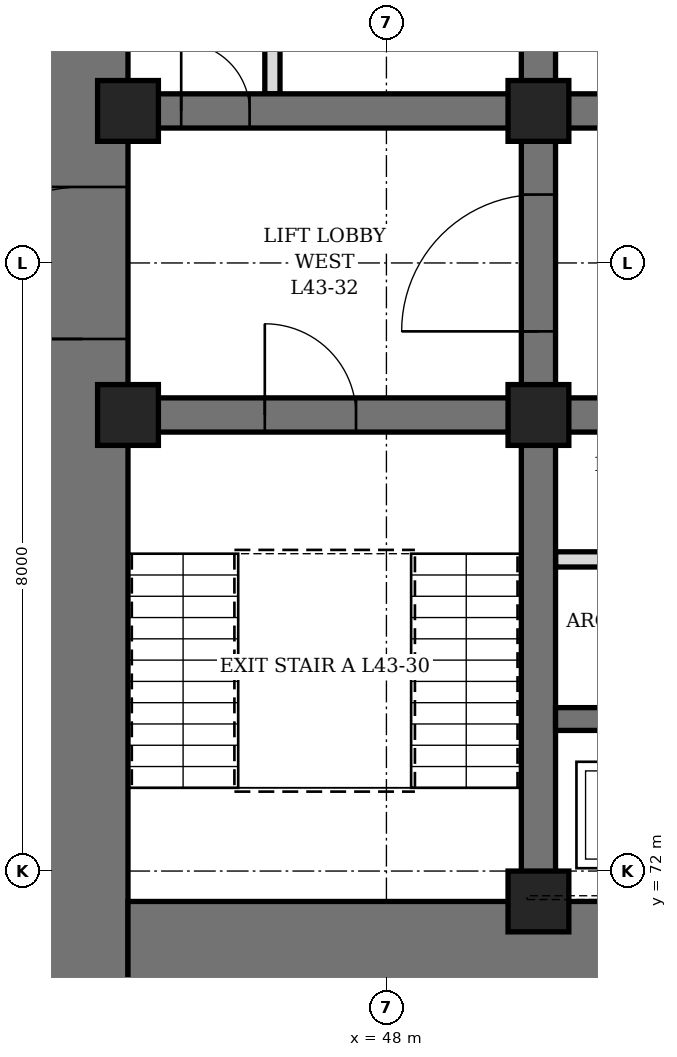
"""IFC4 building model, lengths in metres.
Left out: names, types, materials, properties, quantities, classifications, styles, units other than length and angle.
Written with IfcOpenShell. Run it as: python <this file> out.ifc"""

import sys

from ifc_helpers import new_model, si_unit, direction, frame, frame_2d, origin, origin_2d, place, context, subcontext, project, spatial, rectangle, hollow_rectangle, extrude, element, fill, save


model = new_model("IFC4")
c1 = context("Model", 3, precision=1e-05, world=origin(), true_north=direction((0.0, 1.0)))
c2 = subcontext(c1, "Body", "Model", "MODEL_VIEW")
j1 = project(units=[si_unit("LENGTHUNIT", "METRE"), si_unit("PLANEANGLEUNIT", "RADIAN")], contexts=[c1])
p1 = place(None, origin())
s1 = spatial("IfcSite", under=j1, at=p1, CompositionType="ELEMENT")
p2 = place(p1, origin())
s2 = spatial("IfcBuilding", under=s1, at=p2, CompositionType="ELEMENT")
p3 = place(p2, frame((0.0, 0.0, 193.9)))
s3 = spatial("IfcBuildingStorey", under=s2, at=p3, CompositionType="ELEMENT", Elevation=193.9)
p4 = place(p3, frame((44.0, 70.4, 0.0), z_axis=(0.0, 0.0, 1.0), x_axis=(0.0, 1.0, 0.0)))
e1 = element("IfcWall", 1, at=p4, inside=s3, PredefinedType="SHEAR", context=c2, shape_type="SweptSolid", body=[
    extrude(rectangle(XDim=19.2, YDim=1.2, at=frame_2d((9.6, 0.0))), origin(), (0.0, 0.0, 1.0), 4.2),
])
p5 = place(p4, frame((8.6, 0.0, 0.0)))
e2 = element("IfcOpeningElement", 2, at=p5, cuts=e1, PredefinedType="OPENING", context=c2, shape_type="SweptSolid", body=[
    extrude(rectangle(XDim=2.0, YDim=2.4, at=frame_2d((1.0, 1.2))), frame((0.0, 0.61, 0.0), z_axis=(0.0, -1.0, 0.0), x_axis=(1.0, 0.0, 0.0)), (0.0, 0.0, 1.0), 1.22),
])
p6 = place(p3, frame((44.6, 71.0, 0.0), z_axis=(0.0, 0.0, 1.0), x_axis=(1.0, 0.0, 0.0)))
e3 = element("IfcWall", 3, at=p6, inside=s3, PredefinedType="SHEAR", context=c2, shape_type="SweptSolid", body=[
    extrude(rectangle(XDim=22.8, YDim=1.2, at=frame_2d((11.4, 0.0))), origin(), (0.0, 0.0, 1.0), 4.2),
])
p7 = place(p6, frame((6.35, 0.0, 0.0)))
e4 = element("IfcOpeningElement", 4, at=p7, cuts=e3, PredefinedType="OPENING", context=c2, shape_type="SweptSolid", body=[
    extrude(rectangle(XDim=1.1, YDim=2.2, at=frame_2d((0.55, 1.1))), frame((0.0, 0.61, 0.0), z_axis=(0.0, -1.0, 0.0), x_axis=(1.0, 0.0, 0.0)), (0.0, 0.0, 1.0), 1.22),
])
p8 = place(p6, frame((9.35, 0.0, 0.0)))
e5 = element("IfcOpeningElement", 5, at=p8, cuts=e3, PredefinedType="OPENING", context=c2, shape_type="SweptSolid", body=[
    extrude(rectangle(XDim=1.1, YDim=2.2, at=frame_2d((0.55, 1.1))), frame((0.0, 0.61, 0.0), z_axis=(0.0, -1.0, 0.0), x_axis=(1.0, 0.0, 0.0)), (0.0, 0.0, 1.0), 1.22),
])
p9 = place(p6, frame((12.35, 0.0, 0.0)))
e6 = element("IfcOpeningElement", 6, at=p9, cuts=e3, PredefinedType="OPENING", context=c2, shape_type="SweptSolid", body=[
    extrude(rectangle(XDim=1.1, YDim=2.2, at=frame_2d((0.55, 1.1))), frame((0.0, 0.61, 0.0), z_axis=(0.0, -1.0, 0.0), x_axis=(1.0, 0.0, 0.0)), (0.0, 0.0, 1.0), 1.22),
])
p10 = place(p6, frame((15.35, 0.0, 0.0)))
e7 = element("IfcOpeningElement", 7, at=p10, cuts=e3, PredefinedType="OPENING", context=c2, shape_type="SweptSolid", body=[
    extrude(rectangle(XDim=1.1, YDim=2.2, at=frame_2d((0.55, 1.1))), frame((0.0, 0.61, 0.0), z_axis=(0.0, -1.0, 0.0), x_axis=(1.0, 0.0, 0.0)), (0.0, 0.0, 1.0), 1.22),
])
p11 = place(p3, frame((50.0, 71.6, 0.0), z_axis=(0.0, 0.0, 1.0), x_axis=(0.0, 1.0, 0.0)))
e8 = element("IfcWall", 8, at=p11, inside=s3, PredefinedType="SHEAR", context=c2, shape_type="SweptSolid", body=[
    extrude(rectangle(XDim=16.8, YDim=0.45, at=frame_2d((8.4, 0.0))), origin(), (0.0, 0.0, 1.0), 4.2),
])
p12 = place(p11, frame((7.5, 0.0, 0.0)))
e9 = element("IfcOpeningElement", 9, at=p12, cuts=e8, PredefinedType="OPENING", context=c2, shape_type="SweptSolid", body=[
    extrude(rectangle(XDim=1.8, YDim=2.4, at=frame_2d((0.9, 1.2))), frame((0.0, 0.235, 0.0), z_axis=(0.0, -1.0, 0.0), x_axis=(1.0, 0.0, 0.0)), (0.0, 0.0, 1.0), 0.47),
])
p13 = place(p3, frame((44.6, 78.0, 0.0), z_axis=(0.0, 0.0, 1.0), x_axis=(1.0, 0.0, 0.0)))
e10 = element("IfcWall", 10, at=p13, inside=s3, PredefinedType="SHEAR", context=c2, shape_type="SweptSolid", body=[
    extrude(rectangle(XDim=5.175, YDim=0.45, at=frame_2d((2.587, 0.0))), origin(), (0.0, 0.0, 1.0), 4.2),
])
p14 = place(p13, frame((1.8, 0.0, 0.0)))
e11 = element("IfcOpeningElement", 11, at=p14, cuts=e10, PredefinedType="OPENING", context=c2, shape_type="SweptSolid", body=[
    extrude(rectangle(XDim=1.2, YDim=2.1, at=frame_2d((0.6, 1.05))), frame((0.0, 0.235, 0.0), z_axis=(0.0, -1.0, 0.0), x_axis=(1.0, 0.0, 0.0)), (0.0, 0.0, 1.0), 0.47),
])
p15 = place(p3, frame((44.6, 82.0, 0.0), z_axis=(0.0, 0.0, 1.0), x_axis=(1.0, 0.0, 0.0)))
e12 = element("IfcWall", 12, at=p15, inside=s3, PredefinedType="SHEAR", context=c2, shape_type="SweptSolid", body=[
    extrude(rectangle(XDim=5.175, YDim=0.45, at=frame_2d((2.587, 0.0))), origin(), (0.0, 0.0, 1.0), 4.2),
])
p16 = place(p15, frame((0.7, 0.0, 0.0)))
e13 = element("IfcOpeningElement", 13, at=p16, cuts=e12, PredefinedType="OPENING", context=c2, shape_type="SweptSolid", body=[
    extrude(rectangle(XDim=0.9, YDim=2.1, at=frame_2d((0.45, 1.05))), frame((0.0, 0.235, 0.0), z_axis=(0.0, -1.0, 0.0), x_axis=(1.0, 0.0, 0.0)), (0.0, 0.0, 1.0), 0.47),
])
p17 = place(p3, frame((50.225, 78.0, 0.0), z_axis=(0.0, 0.0, 1.0), x_axis=(1.0, 0.0, 0.0)))
e14 = element("IfcWall", 14, at=p17, inside=s3, PredefinedType="SHEAR", context=c2, shape_type="SweptSolid", body=[
    extrude(rectangle(XDim=11.55, YDim=0.45, at=frame_2d((5.775, 0.0))), origin(), (0.0, 0.0, 1.0), 4.2),
])
p18 = place(p17, frame((0.825, 0.0, 0.0)))
e15 = element("IfcOpeningElement", 15, at=p18, cuts=e14, PredefinedType="OPENING", context=c2, shape_type="SweptSolid", body=[
    extrude(rectangle(XDim=0.9, YDim=2.1, at=frame_2d((0.45, 1.05))), frame((0.0, 0.235, 0.0), z_axis=(0.0, -1.0, 0.0), x_axis=(1.0, 0.0, 0.0)), (0.0, 0.0, 1.0), 0.47),
])
p19 = place(p17, frame((3.825, 0.0, 0.0)))
e16 = element("IfcOpeningElement", 16, at=p19, cuts=e14, PredefinedType="OPENING", context=c2, shape_type="SweptSolid", body=[
    extrude(rectangle(XDim=0.9, YDim=2.1, at=frame_2d((0.45, 1.05))), frame((0.0, 0.235, 0.0), z_axis=(0.0, -1.0, 0.0), x_axis=(1.0, 0.0, 0.0)), (0.0, 0.0, 1.0), 0.47),
])
p20 = place(p17, frame((6.825, 0.0, 0.0)))
e17 = element("IfcOpeningElement", 17, at=p20, cuts=e14, PredefinedType="OPENING", context=c2, shape_type="SweptSolid", body=[
    extrude(rectangle(XDim=0.9, YDim=2.1, at=frame_2d((0.45, 1.05))), frame((0.0, 0.235, 0.0), z_axis=(0.0, -1.0, 0.0), x_axis=(1.0, 0.0, 0.0)), (0.0, 0.0, 1.0), 0.47),
])
p21 = place(p17, frame((9.825, 0.0, 0.0)))
e18 = element("IfcOpeningElement", 18, at=p21, cuts=e14, PredefinedType="OPENING", context=c2, shape_type="SweptSolid", body=[
    extrude(rectangle(XDim=0.9, YDim=2.1, at=frame_2d((0.45, 1.05))), frame((0.0, 0.235, 0.0), z_axis=(0.0, -1.0, 0.0), x_axis=(1.0, 0.0, 0.0)), (0.0, 0.0, 1.0), 0.47),
])
p22 = place(p3, frame((50.225, 82.0, 0.0), z_axis=(0.0, 0.0, 1.0), x_axis=(1.0, 0.0, 0.0)))
e19 = element("IfcWall", 19, at=p22, inside=s3, PredefinedType="SHEAR", context=c2, shape_type="SweptSolid", body=[
    extrude(rectangle(XDim=11.55, YDim=0.45, at=frame_2d((5.775, 0.0))), origin(), (0.0, 0.0, 1.0), 4.2),
])
p23 = place(p22, frame((0.825, 0.0, 0.0)))
e20 = element("IfcOpeningElement", 20, at=p23, cuts=e19, PredefinedType="OPENING", context=c2, shape_type="SweptSolid", body=[
    extrude(rectangle(XDim=0.9, YDim=2.1, at=frame_2d((0.45, 1.05))), frame((0.0, 0.235, 0.0), z_axis=(0.0, -1.0, 0.0), x_axis=(1.0, 0.0, 0.0)), (0.0, 0.0, 1.0), 0.47),
])
p24 = place(p22, frame((3.825, 0.0, 0.0)))
e21 = element("IfcOpeningElement", 21, at=p24, cuts=e19, PredefinedType="OPENING", context=c2, shape_type="SweptSolid", body=[
    extrude(rectangle(XDim=0.9, YDim=2.1, at=frame_2d((0.45, 1.05))), frame((0.0, 0.235, 0.0), z_axis=(0.0, -1.0, 0.0), x_axis=(1.0, 0.0, 0.0)), (0.0, 0.0, 1.0), 0.47),
])
p25 = place(p22, frame((6.825, 0.0, 0.0)))
e22 = element("IfcOpeningElement", 22, at=p25, cuts=e19, PredefinedType="OPENING", context=c2, shape_type="SweptSolid", body=[
    extrude(rectangle(XDim=0.9, YDim=2.1, at=frame_2d((0.45, 1.05))), frame((0.0, 0.235, 0.0), z_axis=(0.0, -1.0, 0.0), x_axis=(1.0, 0.0, 0.0)), (0.0, 0.0, 1.0), 0.47),
])
p26 = place(p22, frame((9.825, 0.0, 0.0)))
e23 = element("IfcOpeningElement", 23, at=p26, cuts=e19, PredefinedType="OPENING", context=c2, shape_type="SweptSolid", body=[
    extrude(rectangle(XDim=0.9, YDim=2.1, at=frame_2d((0.45, 1.05))), frame((0.0, 0.235, 0.0), z_axis=(0.0, -1.0, 0.0), x_axis=(1.0, 0.0, 0.0)), (0.0, 0.0, 1.0), 0.47),
])
p27 = place(p3, frame((50.225, 74.0, 0.0), z_axis=(0.0, 0.0, 1.0), x_axis=(1.0, 0.0, 0.0)))
e24 = element("IfcWall", 24, at=p27, inside=s3, PredefinedType="SHEAR", context=c2, shape_type="SweptSolid", body=[
    extrude(rectangle(XDim=11.55, YDim=0.3, at=frame_2d((5.775, 0.0))), origin(), (0.0, 0.0, 1.0), 4.2),
])
for number, where, z_axis, x_axis in (
    (25, (44.6, 78.0, 0.0), (0.0, 0.0, 1.0), (1.0, 0.0, 0.0)),
    (26, (44.6, 82.0, 0.0), (0.0, 0.0, 1.0), (1.0, 0.0, 0.0)),
    (27, (50.0, 71.6, 0.0), (0.0, 0.0, 1.0), (1.0, 0.0, 0.0)),
    (28, (50.0, 78.0, 0.0), (0.0, 0.0, 1.0), (1.0, 0.0, 0.0)),
    (29, (50.0, 82.0, 0.0), (0.0, 0.0, 1.0), (1.0, 0.0, 0.0)),
):
    element("IfcColumn", number, at=place(p3, frame(where, z_axis=z_axis, x_axis=x_axis)), inside=s3, PredefinedType="COLUMN", context=c2, shape_type="SweptSolid", body=[
        extrude(hollow_rectangle(XDim=0.8, YDim=0.8, WallThickness=0.1, at=origin_2d()), origin(), (0.0, 0.0, 1.0), 4.2),
    ])
p28 = place(p3, frame((46.5, 82.225, 0.0), z_axis=(0.0, 0.0, 1.0), x_axis=(0.0, 1.0, 0.0)))
e30 = element("IfcWall", 30, at=p28, inside=s3, PredefinedType="PARTITIONING", context=c2, shape_type="SweptSolid", body=[
    extrude(rectangle(XDim=3.05, YDim=0.2, at=frame_2d((1.525, 0.0))), origin(), (0.0, 0.0, 1.0), 4.04),
])
p29 = place(p28, frame((1.075, 0.0, 0.0)))
e31 = element("IfcOpeningElement", 31, at=p29, cuts=e30, PredefinedType="OPENING", context=c2, shape_type="SweptSolid", body=[
    extrude(rectangle(XDim=0.9, YDim=2.1, at=frame_2d((0.45, 1.05))), frame((0.0, 0.11, 0.0), z_axis=(0.0, -1.0, 0.0), x_axis=(1.0, 0.0, 0.0)), (0.0, 0.0, 1.0), 0.22),
])
p30 = place(p3, frame((50.225, 76.1, 0.0), z_axis=(0.0, 0.0, 1.0), x_axis=(1.0, 0.0, 0.0)))
e32 = element("IfcWall", 32, at=p30, inside=s3, PredefinedType="PARTITIONING", context=c2, shape_type="SweptSolid", body=[
    extrude(rectangle(XDim=2.55, YDim=0.2, at=frame_2d((1.275, 0.0))), origin(), (0.0, 0.0, 1.0), 4.04),
])
p31 = place(p30, frame((0.825, 0.0, 0.0)))
e33 = element("IfcOpeningElement", 33, at=p31, cuts=e32, PredefinedType="OPENING", context=c2, shape_type="SweptSolid", body=[
    extrude(rectangle(XDim=0.9, YDim=2.1, at=frame_2d((0.45, 1.05))), frame((0.0, 0.11, 0.0), z_axis=(0.0, -1.0, 0.0), x_axis=(1.0, 0.0, 0.0)), (0.0, 0.0, 1.0), 0.22),
])
p32 = place(p16, origin())
e34 = element("IfcDoor", 34, at=p32, inside=s3, OperationType="SINGLE_SWING_LEFT", PredefinedType="DOOR", context=c2, shape_type="SweptSolid", body=[
    extrude(rectangle(XDim=0.9, YDim=2.1, at=frame_2d((0.45, 1.05))), frame((0.0, 0.225, 0.0), z_axis=(0.0, -1.0, 0.0), x_axis=(1.0, 0.0, 0.0)), (0.0, 0.0, 1.0), 0.449),
])
fill(e13, e34)
p33 = place(p14, origin())
e35 = element("IfcDoor", 35, at=p33, inside=s3, OperationType="SINGLE_SWING_LEFT", PredefinedType="DOOR", context=c2, shape_type="SweptSolid", body=[
    extrude(rectangle(XDim=1.2, YDim=2.1, at=frame_2d((0.6, 1.05))), frame((0.0, 0.225, 0.0), z_axis=(0.0, -1.0, 0.0), x_axis=(1.0, 0.0, 0.0)), (0.0, 0.0, 1.0), 0.449),
])
fill(e11, e35)
p34 = place(p5, origin())
e36 = element("IfcDoor", 36, at=p34, inside=s3, OperationType="DOUBLE_DOOR_SINGLE_SWING", PredefinedType="DOOR", context=c2, shape_type="SweptSolid", body=[
    extrude(rectangle(XDim=2.0, YDim=2.4, at=frame_2d((1.0, 1.2))), frame((0.0, 0.35, 0.0), z_axis=(0.0, -1.0, 0.0), x_axis=(1.0, 0.0, 0.0)), (0.0, 0.0, 1.0), 0.7),
])
fill(e2, e36)
p35 = place(p12, origin())
e37 = element("IfcDoor", 37, at=p35, inside=s3, OperationType="DOUBLE_DOOR_SINGLE_SWING", PredefinedType="DOOR", context=c2, shape_type="SweptSolid", body=[
    extrude(rectangle(XDim=1.8, YDim=2.4, at=frame_2d((0.9, 1.2))), frame((0.0, 0.225, 0.0), z_axis=(0.0, -1.0, 0.0), x_axis=(1.0, 0.0, 0.0)), (0.0, 0.0, 1.0), 0.449),
])
fill(e9, e37)
save(model, sys.argv[1])
